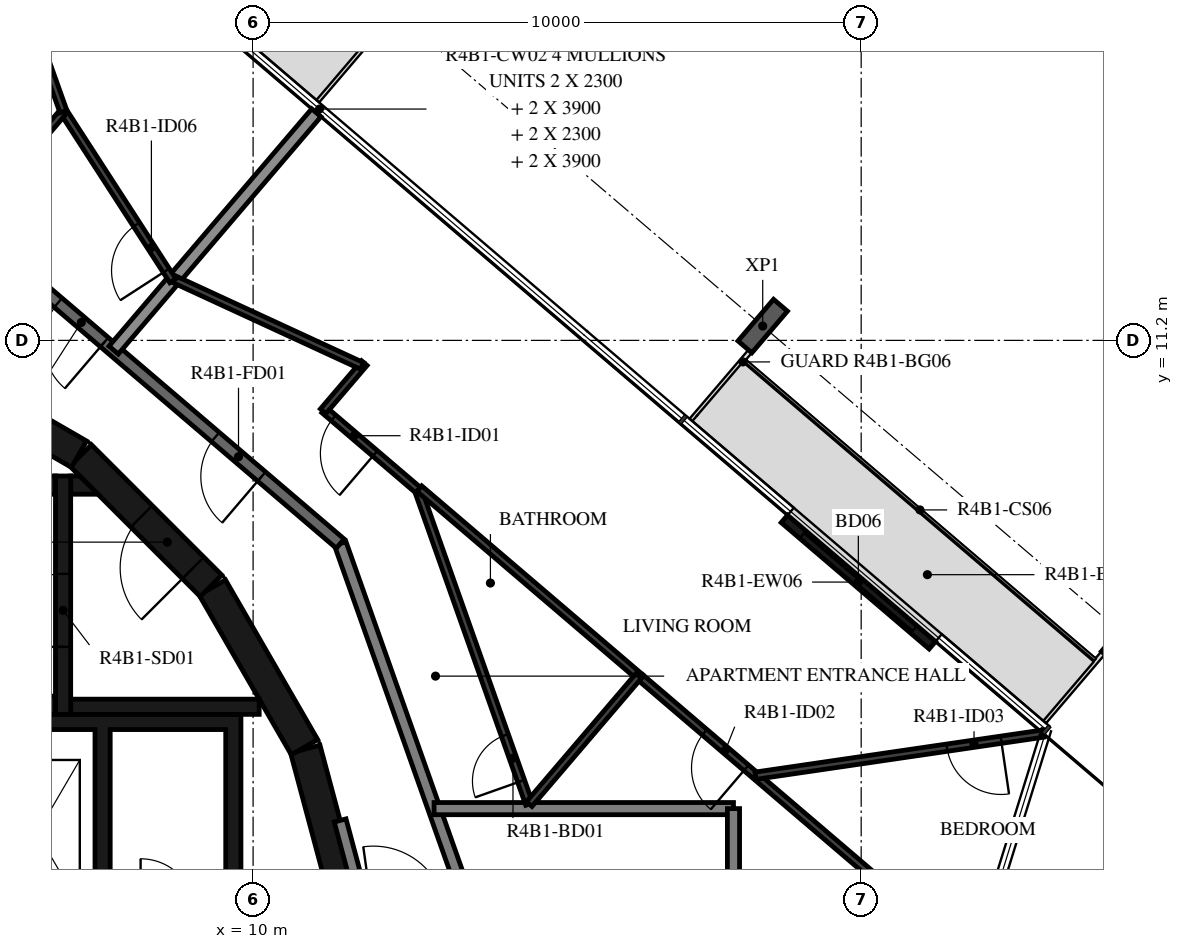
"""IFC4 building model, lengths in metres.
Left out: names, types, materials, properties, quantities, classifications, styles, units other than length and angle.
Written with IfcOpenShell. Run it as: python <this file> out.ifc"""

import sys

from ifc_helpers import new_model, si_unit, direction, frame, frame_2d, origin, origin_2d, place, context, subcontext, project, spatial, polyline, rectangle, i_section, outline, extrude, element, fill, save


model = new_model("IFC4")
c1 = context("Model", 3, precision=1e-05, world=origin(), true_north=direction((0.0, 1.0)))
c2 = subcontext(c1, "Body", "Model", "MODEL_VIEW")
j1 = project(units=[si_unit("LENGTHUNIT", "METRE"), si_unit("PLANEANGLEUNIT", "RADIAN")], contexts=[c1])
p1 = place(None, origin())
s1 = spatial("IfcSite", under=j1, at=p1, CompositionType="ELEMENT")
p2 = place(p1, origin())
s2 = spatial("IfcBuilding", under=s1, at=p2, CompositionType="ELEMENT")
p3 = place(p2, frame((0.0, 0.0, 162.2)))
s3 = spatial("IfcBuildingStorey", under=s2, at=p3, CompositionType="ELEMENT", Elevation=162.2)
for number, where, z_axis, x_axis in (
    (1, (24.358, 6.331, -0.38), (0.0, 0.0, 1.0), (0.76, -0.649, 0.0)),
    (2, (18.381, 11.436, -0.38), (0.0, 0.0, 1.0), (0.76, -0.649, 0.0)),
):
    element("IfcColumn", number, at=place(p3, frame(where, z_axis=z_axis, x_axis=x_axis)), inside=s3, PredefinedType="COLUMN", context=c2, shape_type="SweptSolid", body=[
        extrude(i_section(OverallWidth=0.3, OverallDepth=0.9, WebThickness=0.019, FlangeThickness=0.035, FilletRadius=0.03, at=origin_2d()), origin(), (0.0, 0.0, 1.0), 3.5),
    ])
p4 = place(p3, frame((21.17, 6.186, 0.0), z_axis=(0.0, 0.0, 1.0), x_axis=(-0.760359548534, 0.649502391799, 0.0)))
e3 = element("IfcWall", 3, at=p4, inside=s3, PredefinedType="STANDARD", context=c2, shape_type="SweptSolid", body=[
    extrude(rectangle(XDim=3.2, YDim=0.16, at=frame_2d((1.6, 0.0))), origin(), (0.0, 0.0, 1.0), 3.12),
])
p5 = place(p4, frame((0.4, 0.0, 0.0)))
e4 = element("IfcOpeningElement", 4, at=p5, cuts=e3, PredefinedType="OPENING", context=c2, shape_type="SweptSolid", body=[
    extrude(rectangle(XDim=2.4, YDim=2.4, at=frame_2d((1.2, 1.2))), frame((0.0, 0.09, 0.0), z_axis=(0.0, -1.0, 0.0), x_axis=(1.0, 0.0, 0.0)), (0.0, 0.0, 1.0), 0.18),
])
for number, where, z_axis, x_axis in (
    (5, (11.643, 1.55, 0.0), (0.0, 0.0, 1.0), (-0.259, 0.966, 0.0)),
    (6, (10.845, 4.51, 0.0), (0.0, 0.0, 1.0), (-0.5, 0.866, 0.0)),
):
    element("IfcWall", number, at=place(p3, frame(where, z_axis=z_axis, x_axis=x_axis)), inside=s3, PredefinedType="SHEAR", context=c2, shape_type="SweptSolid", body=[
        extrude(rectangle(XDim=3.033, YDim=0.5, at=frame_2d((1.516, 0.0))), origin(), (0.0, 0.0, 1.0), 3.12),
    ])
p6 = place(p3, frame((9.308, 7.164, 0.0), z_axis=(0.0, 0.0, 1.0), x_axis=(-0.707106781187, 0.707106781187, 0.0)))
e7 = element("IfcWall", 7, at=p6, inside=s3, PredefinedType="SHEAR", context=c2, shape_type="SweptSolid", body=[
    extrude(rectangle(XDim=3.032, YDim=0.5, at=frame_2d((1.516, 0.0))), origin(), (0.0, 0.0, 1.0), 3.12),
])
p7 = place(p6, frame((0.416, 0.0, 0.0)))
e8 = element("IfcOpeningElement", 8, at=p7, cuts=e7, PredefinedType="OPENING", context=c2, shape_type="SweptSolid", body=[
    extrude(rectangle(XDim=1.2, YDim=2.1, at=frame_2d((0.6, 1.05))), frame((0.0, 0.26, 0.0), z_axis=(0.0, -1.0, 0.0), x_axis=(1.0, 0.0, 0.0)), (0.0, 0.0, 1.0), 0.52),
])
p8 = place(p3, frame((7.137, 9.329, 0.0), z_axis=(0.0, 0.0, 1.0), x_axis=(-0.865975092491, 0.500087131594, 0.0)))
e9 = element("IfcWall", 9, at=p8, inside=s3, PredefinedType="SHEAR", context=c2, shape_type="SweptSolid", body=[
    extrude(rectangle(XDim=3.033, YDim=0.5, at=frame_2d((1.516, 0.0))), origin(), (0.0, 0.0, 1.0), 3.12),
])
for number, where, z_axis, x_axis in (
    (10, (0.0, 5.2, 0.0), (0.0, 0.0, 1.0), (1.0, 0.0, 0.0)),
    (11, (0.0, 8.82, 0.0), (0.0, 0.0, 1.0), (1.0, 0.0, 0.0)),
):
    element("IfcWall", number, at=place(p3, frame(where, z_axis=z_axis, x_axis=x_axis)), inside=s3, PredefinedType="SHEAR", context=c2, shape_type="SweptSolid", body=[
        extrude(rectangle(XDim=6.75, YDim=0.3, at=frame_2d((3.375, 0.0))), origin(), (0.0, 0.0, 1.0), 3.12),
    ])
p9 = place(p3, frame((6.875, 5.05, 0.0), z_axis=(0.0, 0.0, 1.0), x_axis=(0.0, 1.0, 0.0)))
e12 = element("IfcWall", 12, at=p9, inside=s3, PredefinedType="SHEAR", context=c2, shape_type="SweptSolid", body=[
    extrude(rectangle(XDim=3.92, YDim=0.25, at=frame_2d((1.96, 0.0))), origin(), (0.0, 0.0, 1.0), 3.12),
])
p10 = place(p9, frame((1.11, 0.0, 0.0)))
e13 = element("IfcOpeningElement", 13, at=p10, cuts=e12, PredefinedType="OPENING", context=c2, shape_type="SweptSolid", body=[
    extrude(rectangle(XDim=1.2, YDim=2.1, at=frame_2d((0.6, 1.05))), frame((0.0, 0.135, 0.0), z_axis=(0.0, -1.0, 0.0), x_axis=(1.0, 0.0, 0.0)), (0.0, 0.0, 1.0), 0.27),
])
p11 = place(p3, frame((7.0, 5.175, 0.0), z_axis=(0.0, 0.0, 1.0), x_axis=(1.0, 0.0, 0.0)))
e14 = element("IfcWall", 14, at=p11, inside=s3, PredefinedType="SHEAR", context=c2, shape_type="SweptSolid", body=[
    extrude(rectangle(XDim=3.1, YDim=0.25, at=frame_2d((1.55, 0.0))), origin(), (0.0, 0.0, 1.0), 3.12),
])
p12 = place(p3, origin())
e15 = element("IfcWall", 15, at=p12, inside=s3, PredefinedType="SHEAR", context=c2, shape_type="SweptSolid", body=[
    extrude(outline(polyline([(7.448, 8.67), (7.0, 8.67), (7.0, 8.97), (7.148, 8.97), (7.448, 8.67)])), origin(), (0.0, 0.0, 1.0), 3.12),
])
p13 = place(p3, origin())
e16 = element("IfcWall", 16, at=p13, inside=s3, PredefinedType="SHEAR", context=c2, shape_type="SweptSolid", body=[
    extrude(outline(polyline([(-9.55, 4.8), (-5.5, 4.8), (-5.5, 1.9), (-5.25, 1.9), (-5.25, 4.8), (-1.2, 4.8), (-1.2, 1.9), (-0.95, 1.9), (-0.95, 4.8), (0.95, 4.8), (0.95, 1.9), (1.2, 1.9), (1.2, 4.8), (3.1, 4.8), (3.1, 1.9), (3.35, 1.9), (3.35, 4.8), (5.25, 4.8), (5.25, 1.9), (5.5, 1.9), (5.5, 4.8), (7.4, 4.8), (7.4, 1.9), (7.65, 1.9), (7.65, 4.8), (9.55, 4.8), (9.55, 1.9), (9.8, 1.9), (9.8, 4.8), (9.8, 5.05), (-9.8, 5.05), (-9.8, 4.8), (-9.8, 1.9), (-9.55, 1.9), (-9.55, 4.8)])), origin(), (0.0, 0.0, 1.0), 3.12),
])
p14 = place(p3, frame((11.87, 1.668, 0.0), z_axis=(0.0, 0.0, 1.0), x_axis=(-0.258836880648, 0.965921047093, 0.0)))
e17 = element("IfcWall", 17, at=p14, inside=s3, PredefinedType="STANDARD", context=c2, shape_type="SweptSolid", body=[
    extrude(rectangle(XDim=1.695, YDim=0.2, at=frame_2d((0.848, 0.0))), origin(), (0.0, 0.0, 1.0), 3.12),
])
p15 = place(p3, frame((13.542, 1.903, 0.0), z_axis=(0.0, 0.0, 1.0), x_axis=(-0.333808508206, 0.942640907159, 0.0)))
e18 = element("IfcWall", 18, at=p15, inside=s3, PredefinedType="STANDARD", context=c2, shape_type="SweptSolid", body=[
    extrude(rectangle(XDim=6.317, YDim=0.2, at=frame_2d((3.158, 0.0))), origin(), (0.0, 0.0, 1.0), 3.12),
])
p16 = place(p3, frame((11.433, 7.858, 0.0), z_axis=(0.0, 0.0, 1.0), x_axis=(-0.760412154545, 0.649440801937, 0.0)))
e19 = element("IfcWall", 19, at=p16, inside=s3, PredefinedType="STANDARD", context=c2, shape_type="SweptSolid", body=[
    extrude(rectangle(XDim=7.181, YDim=0.2, at=frame_2d((3.59, 0.0))), origin(), (0.0, 0.0, 1.0), 3.12),
])
p17 = place(p16, frame((1.7, 0.0, 0.0)))
e20 = element("IfcOpeningElement", 20, at=p17, cuts=e19, PredefinedType="OPENING", context=c2, shape_type="SweptSolid", body=[
    extrude(rectangle(XDim=1.0, YDim=2.1, at=frame_2d((0.5, 1.05))), frame((0.0, 0.11, 0.0), z_axis=(0.0, -1.0, 0.0), x_axis=(1.0, 0.0, 0.0)), (0.0, 0.0, 1.0), 0.22),
])
p18 = place(p16, frame((5.101, 0.0, 0.0)))
e21 = element("IfcOpeningElement", 21, at=p18, cuts=e19, PredefinedType="OPENING", context=c2, shape_type="SweptSolid", body=[
    extrude(rectangle(XDim=1.0, YDim=2.1, at=frame_2d((0.5, 1.05))), frame((0.0, 0.11, 0.0), z_axis=(0.0, -1.0, 0.0), x_axis=(1.0, 0.0, 0.0)), (0.0, 0.0, 1.0), 0.22),
])
p19 = place(p3, frame((17.9, 3.5, 0.0), z_axis=(0.0, 0.0, 1.0), x_axis=(-1.0, 0.0, 0.0)))
e22 = element("IfcWall", 22, at=p19, inside=s3, PredefinedType="STANDARD", context=c2, shape_type="SweptSolid", body=[
    extrude(rectangle(XDim=4.924, YDim=0.2, at=frame_2d((2.462, 0.0))), origin(), (0.0, 0.0, 1.0), 3.12),
])
p20 = place(p3, frame((17.9, -3.318, 0.0), z_axis=(0.0, 0.0, 1.0), x_axis=(0.0, 1.0, 0.0)))
e23 = element("IfcWall", 23, at=p20, inside=s3, PredefinedType="STANDARD", context=c2, shape_type="SweptSolid", body=[
    extrude(rectangle(XDim=6.818, YDim=0.2, at=frame_2d((3.409, 0.0))), origin(), (0.0, 0.0, 1.0), 3.12),
])
p21 = place(p3, frame((11.04, 14.943, 0.0), z_axis=(0.0, 0.0, 1.0), x_axis=(-0.649442880087, -0.760410379666, 0.0)))
e24 = element("IfcWall", 24, at=p21, inside=s3, PredefinedType="STANDARD", context=c2, shape_type="SweptSolid", body=[
    extrude(rectangle(XDim=5.133, YDim=0.2, at=frame_2d((2.566, 0.0))), origin(), (0.0, 0.0, 1.0), 2.73),
])
p22 = place(p3, frame((14.541, 3.575, 0.0), z_axis=(0.0, 0.0, 1.0), x_axis=(-0.333799280318, 0.942644174893, 0.0)))
e25 = element("IfcWall", 25, at=p22, inside=s3, PredefinedType="PARTITIONING", context=c2, shape_type="SweptSolid", body=[
    extrude(rectangle(XDim=5.477, YDim=0.12, at=frame_2d((2.738, 0.0))), origin(), (0.0, 0.0, 1.0), 3.12),
])
p23 = place(p22, frame((0.4, 0.0, 0.0)))
e26 = element("IfcOpeningElement", 26, at=p23, cuts=e25, PredefinedType="OPENING", context=c2, shape_type="SweptSolid", body=[
    extrude(rectangle(XDim=0.8, YDim=2.1, at=frame_2d((0.4, 1.05))), frame((0.0, 0.07, 0.0), z_axis=(0.0, -1.0, 0.0), x_axis=(1.0, 0.0, 0.0)), (0.0, 0.0, 1.0), 0.14),
])
p24 = place(p3, frame((12.713, 8.737, 0.0), z_axis=(0.0, 0.0, 1.0), x_axis=(-0.760410825807, 0.649442357716, 0.0)))
e27 = element("IfcWall", 27, at=p24, inside=s3, PredefinedType="PARTITIONING", context=c2, shape_type="SweptSolid", body=[
    extrude(rectangle(XDim=2.029, YDim=0.12, at=frame_2d((1.014, 0.0))), origin(), (0.0, 0.0, 1.0), 3.12),
])
p25 = place(p24, frame((0.929, 0.0, 0.0)))
e28 = element("IfcOpeningElement", 28, at=p25, cuts=e27, PredefinedType="OPENING", context=c2, shape_type="SweptSolid", body=[
    extrude(rectangle(XDim=0.9, YDim=2.1, at=frame_2d((0.45, 1.05))), frame((0.0, 0.07, 0.0), z_axis=(0.0, -1.0, 0.0), x_axis=(1.0, 0.0, 0.0)), (0.0, 0.0, 1.0), 0.14),
])
p26 = place(p3, frame((12.734, 8.762, 0.0), z_axis=(0.0, 0.0, 1.0), x_axis=(0.760390484255, -0.649466174219, 0.0)))
e29 = element("IfcWall", 29, at=p26, inside=s3, PredefinedType="PARTITIONING", context=c2, shape_type="SweptSolid", body=[
    extrude(rectangle(XDim=4.783, YDim=0.12, at=frame_2d((2.391, 0.0))), origin(), (0.0, 0.0, 1.0), 3.12),
])
p27 = place(p3, frame((11.153, 10.034, 0.0), z_axis=(0.0, 0.0, 1.0), x_axis=(0.649381401329, 0.760462882466, 0.0)))
e30 = element("IfcWall", 30, at=p27, inside=s3, PredefinedType="PARTITIONING", context=c2, shape_type="SweptSolid", body=[
    extrude(rectangle(XDim=1.042, YDim=0.12, at=frame_2d((0.521, 0.0))), origin(), (0.0, 0.0, 1.0), 3.12),
])
p28 = place(p3, frame((11.79, 10.781, 0.0), z_axis=(0.0, 0.0, 1.0), x_axis=(-0.907999296286, 0.418971691101, 0.0)))
e31 = element("IfcWall", 31, at=p28, inside=s3, PredefinedType="PARTITIONING", context=c2, shape_type="SweptSolid", body=[
    extrude(rectangle(XDim=3.401, YDim=0.12, at=frame_2d((1.701, 0.0))), origin(), (0.0, 0.0, 1.0), 3.12),
])
p29 = place(p3, frame((23.411, -0.357, 0.0), z_axis=(0.0, 0.0, 1.0), x_axis=(-0.76041871148, 0.649433124525, 0.0)))
e32 = element("IfcWall", 32, at=p29, inside=s3, PredefinedType="PARTITIONING", context=c2, shape_type="SweptSolid", body=[
    extrude(rectangle(XDim=9.259, YDim=0.12, at=frame_2d((4.629, 0.0))), origin(), (0.0, 0.0, 1.0), 3.12),
])
p30 = place(p29, frame((6.972, 0.0, 0.0)))
e33 = element("IfcOpeningElement", 33, at=p30, cuts=e32, PredefinedType="OPENING", context=c2, shape_type="SweptSolid", body=[
    extrude(rectangle(XDim=0.9, YDim=2.1, at=frame_2d((0.45, 1.05))), frame((0.0, 0.07, 0.0), z_axis=(0.0, -1.0, 0.0), x_axis=(1.0, 0.0, 0.0)), (0.0, 0.0, 1.0), 0.14),
])
p31 = place(p29, frame((0.2, 0.0, 0.0)))
e34 = element("IfcOpeningElement", 34, at=p31, cuts=e32, PredefinedType="OPENING", context=c2, shape_type="SweptSolid", body=[
    extrude(rectangle(XDim=0.9, YDim=2.1, at=frame_2d((0.45, 1.05))), frame((0.0, 0.07, 0.0), z_axis=(0.0, -1.0, 0.0), x_axis=(1.0, 0.0, 0.0)), (0.0, 0.0, 1.0), 0.14),
])
p32 = place(p3, frame((16.341, 5.682, 0.0), z_axis=(0.0, 0.0, 1.0), x_axis=(-0.64946993237, -0.76038727432, 0.0)))
e35 = element("IfcWall", 35, at=p32, inside=s3, PredefinedType="PARTITIONING", context=c2, shape_type="SweptSolid", body=[
    extrude(rectangle(XDim=2.771, YDim=0.12, at=frame_2d((1.386, 0.0))), origin(), (0.0, 0.0, 1.0), 3.12),
])
p33 = place(p3, frame((22.994, 4.734, 0.0), z_axis=(0.0, 0.0, 1.0), x_axis=(-0.989449286977, -0.144879634529, 0.0)))
e36 = element("IfcWall", 36, at=p33, inside=s3, PredefinedType="PARTITIONING", context=c2, shape_type="SweptSolid", body=[
    extrude(rectangle(XDim=4.782, YDim=0.12, at=frame_2d((2.391, 0.0))), origin(), (0.0, 0.0, 1.0), 3.12),
])
p34 = place(p33, frame((0.7, 0.0, 0.0)))
e37 = element("IfcOpeningElement", 37, at=p34, cuts=e36, PredefinedType="OPENING", context=c2, shape_type="SweptSolid", body=[
    extrude(rectangle(XDim=0.9, YDim=2.1, at=frame_2d((0.45, 1.05))), frame((0.0, 0.07, 0.0), z_axis=(0.0, -1.0, 0.0), x_axis=(1.0, 0.0, 0.0)), (0.0, 0.0, 1.0), 0.14),
])
p35 = place(p3, frame((8.681, 12.181, 0.0), z_axis=(0.0, 0.0, 1.0), x_axis=(-0.543187118914, 0.839611668479, 0.0)))
e38 = element("IfcWall", 38, at=p35, inside=s3, PredefinedType="PARTITIONING", context=c2, shape_type="SweptSolid", body=[
    extrude(rectangle(XDim=3.313, YDim=0.12, at=frame_2d((1.657, 0.0))), origin(), (0.0, 0.0, 1.0), 3.12),
])
p36 = place(p35, frame((0.2, 0.0, 0.0)))
e39 = element("IfcOpeningElement", 39, at=p36, cuts=e38, PredefinedType="OPENING", context=c2, shape_type="SweptSolid", body=[
    extrude(rectangle(XDim=0.9, YDim=2.1, at=frame_2d((0.45, 1.05))), frame((0.0, 0.07, 0.0), z_axis=(0.0, -1.0, 0.0), x_axis=(1.0, 0.0, 0.0)), (0.0, 0.0, 1.0), 0.14),
])
p37 = place(p3, frame((6.881, 14.963, 0.0), z_axis=(0.0, 0.0, 1.0), x_axis=(-0.649402250594, -0.760445078177, 0.0)))
e40 = element("IfcWall", 40, at=p37, inside=s3, PredefinedType="PARTITIONING", context=c2, shape_type="SweptSolid", body=[
    extrude(rectangle(XDim=1.231, YDim=0.12, at=frame_2d((0.616, 0.0))), origin(), (0.0, 0.0, 1.0), 3.12),
])
p38 = place(p3, frame((5.043, 20.105, 0.0), z_axis=(0.0, 0.0, 1.0), x_axis=(0.336608273763, -0.941644768495, 0.0)))
e41 = element("IfcWall", 41, at=p38, inside=s3, PredefinedType="PARTITIONING", context=c2, shape_type="SweptSolid", body=[
    extrude(rectangle(XDim=5.461, YDim=0.12, at=frame_2d((2.73, 0.0))), origin(), (0.0, 0.0, 1.0), 3.12),
])
p39 = place(p5, origin())
e42 = element("IfcDoor", 42, at=p39, inside=s3, OperationType="DOUBLE_DOOR_SLIDING", PredefinedType="DOOR", context=c2, shape_type="SweptSolid", body=[
    extrude(rectangle(XDim=2.4, YDim=2.4, at=frame_2d((1.2, 1.2))), frame((0.0, 0.025, 0.0), z_axis=(0.0, -1.0, 0.0), x_axis=(1.0, 0.0, 0.0)), (0.0, 0.0, 1.0), 0.05),
])
fill(e4, e42)
p40 = place(p10, origin())
e43 = element("IfcDoor", 43, at=p40, inside=s3, OperationType="SINGLE_SWING_LEFT", PredefinedType="DOOR", context=c2, shape_type="SweptSolid", body=[
    extrude(rectangle(XDim=1.2, YDim=2.1, at=frame_2d((0.6, 1.05))), frame((0.0, 0.025, 0.0), z_axis=(0.0, -1.0, 0.0), x_axis=(1.0, 0.0, 0.0)), (0.0, 0.0, 1.0), 0.05),
])
fill(e13, e43)
p41 = place(p7, origin())
e44 = element("IfcDoor", 44, at=p41, inside=s3, OperationType="SINGLE_SWING_RIGHT", PredefinedType="DOOR", context=c2, shape_type="SweptSolid", body=[
    extrude(rectangle(XDim=1.2, YDim=2.1, at=frame_2d((0.6, 1.05))), frame((0.0, 0.025, 0.0), z_axis=(0.0, -1.0, 0.0), x_axis=(1.0, 0.0, 0.0)), (0.0, 0.0, 1.0), 0.05),
])
fill(e8, e44)
p42 = place(p17, origin())
e45 = element("IfcDoor", 45, at=p42, inside=s3, OperationType="SINGLE_SWING_LEFT", PredefinedType="DOOR", context=c2, shape_type="SweptSolid", body=[
    extrude(rectangle(XDim=1.0, YDim=2.1, at=frame_2d((0.5, 1.05))), frame((0.0, 0.025, 0.0), z_axis=(0.0, -1.0, 0.0), x_axis=(1.0, 0.0, 0.0)), (0.0, 0.0, 1.0), 0.05),
])
fill(e20, e45)
p43 = place(p23, origin())
e46 = element("IfcDoor", 46, at=p43, inside=s3, OperationType="SINGLE_SWING_LEFT", PredefinedType="DOOR", context=c2, shape_type="SweptSolid", body=[
    extrude(rectangle(XDim=0.8, YDim=2.1, at=frame_2d((0.4, 1.05))), frame((0.0, 0.025, 0.0), z_axis=(0.0, -1.0, 0.0), x_axis=(1.0, 0.0, 0.0)), (0.0, 0.0, 1.0), 0.05),
])
fill(e26, e46)
p44 = place(p25, origin())
e47 = element("IfcDoor", 47, at=p44, inside=s3, OperationType="SINGLE_SWING_LEFT", PredefinedType="DOOR", context=c2, shape_type="SweptSolid", body=[
    extrude(rectangle(XDim=0.9, YDim=2.1, at=frame_2d((0.45, 1.05))), frame((0.0, 0.025, 0.0), z_axis=(0.0, -1.0, 0.0), x_axis=(1.0, 0.0, 0.0)), (0.0, 0.0, 1.0), 0.05),
])
fill(e28, e47)
p45 = place(p30, origin())
e48 = element("IfcDoor", 48, at=p45, inside=s3, OperationType="SINGLE_SWING_RIGHT", PredefinedType="DOOR", context=c2, shape_type="SweptSolid", body=[
    extrude(rectangle(XDim=0.9, YDim=2.1, at=frame_2d((0.45, 1.05))), frame((0.0, 0.025, 0.0), z_axis=(0.0, -1.0, 0.0), x_axis=(1.0, 0.0, 0.0)), (0.0, 0.0, 1.0), 0.05),
])
fill(e33, e48)
p46 = place(p34, origin())
e49 = element("IfcDoor", 49, at=p46, inside=s3, OperationType="SINGLE_SWING_LEFT", PredefinedType="DOOR", context=c2, shape_type="SweptSolid", body=[
    extrude(rectangle(XDim=0.9, YDim=2.1, at=frame_2d((0.45, 1.05))), frame((0.0, 0.025, 0.0), z_axis=(0.0, -1.0, 0.0), x_axis=(1.0, 0.0, 0.0)), (0.0, 0.0, 1.0), 0.05),
])
fill(e37, e49)
p47 = place(p18, origin())
e50 = element("IfcDoor", 50, at=p47, inside=s3, OperationType="SINGLE_SWING_RIGHT", PredefinedType="DOOR", context=c2, shape_type="SweptSolid", body=[
    extrude(rectangle(XDim=1.0, YDim=2.1, at=frame_2d((0.5, 1.05))), frame((0.0, 0.025, 0.0), z_axis=(0.0, -1.0, 0.0), x_axis=(1.0, 0.0, 0.0)), (0.0, 0.0, 1.0), 0.05),
])
fill(e21, e50)
p48 = place(p36, origin())
e51 = element("IfcDoor", 51, at=p48, inside=s3, OperationType="SINGLE_SWING_RIGHT", PredefinedType="DOOR", context=c2, shape_type="SweptSolid", body=[
    extrude(rectangle(XDim=0.9, YDim=2.1, at=frame_2d((0.45, 1.05))), frame((0.0, 0.025, 0.0), z_axis=(0.0, -1.0, 0.0), x_axis=(1.0, 0.0, 0.0)), (0.0, 0.0, 1.0), 0.05),
])
fill(e39, e51)
save(model, sys.argv[1])
